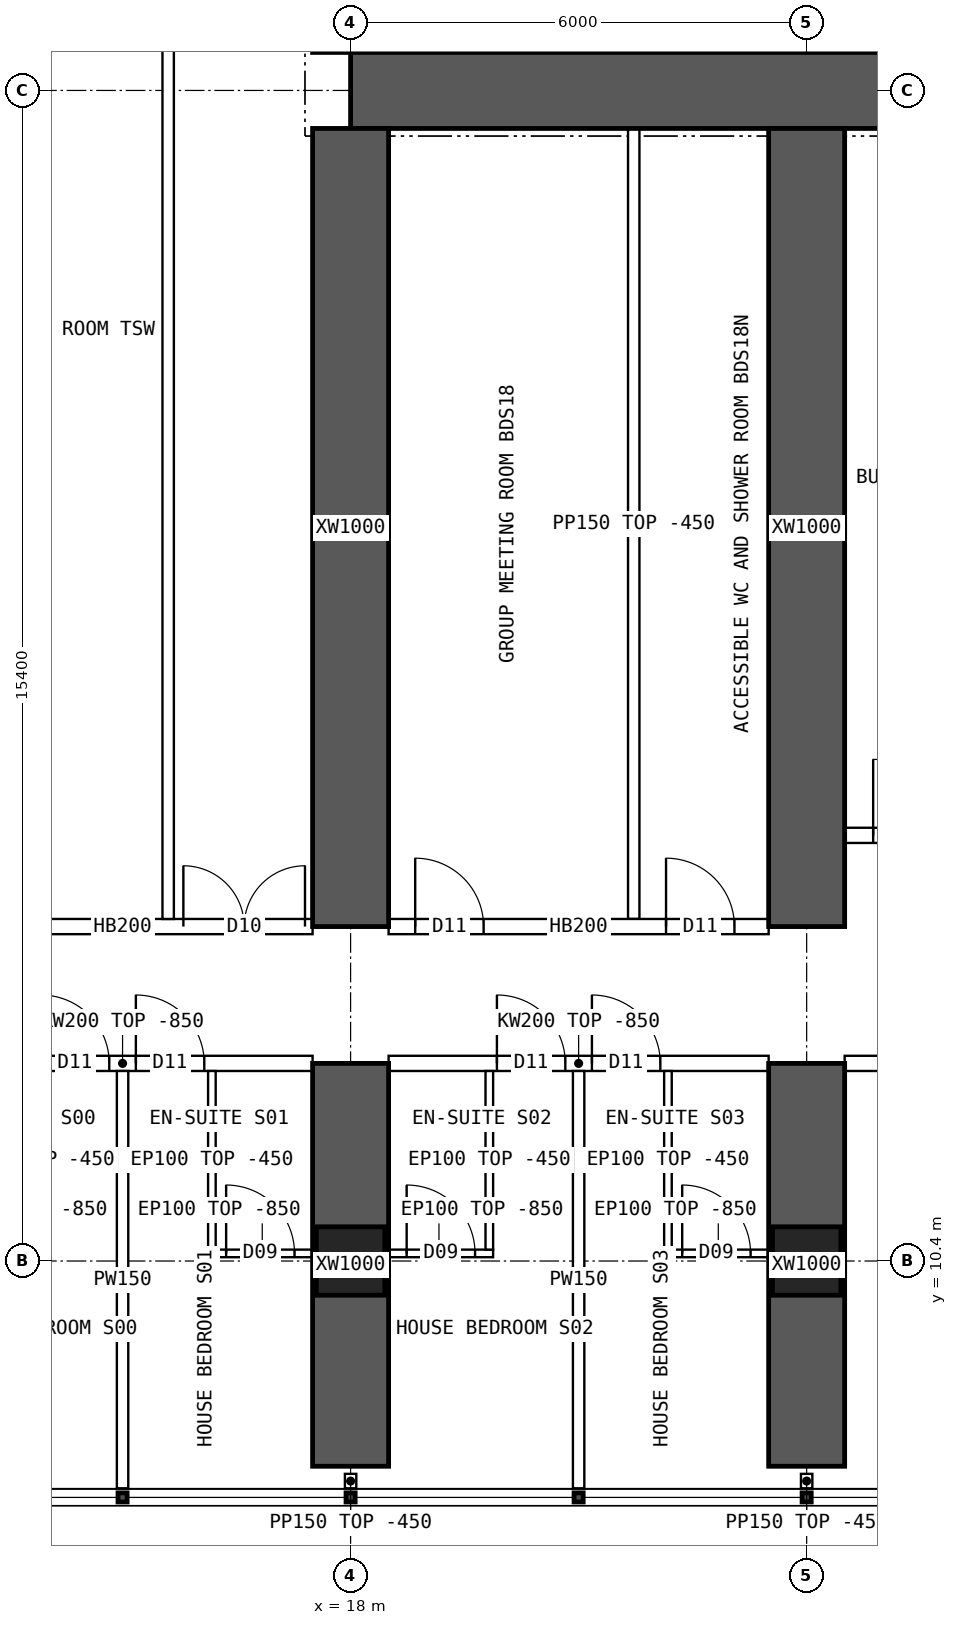
"""IFC4 building model, lengths in metres.
Left out: names, types, materials, properties, quantities, classifications, styles, units other than length and angle.
Written with IfcOpenShell. Run it as: python <this file> out.ifc"""

import sys

from ifc_helpers import new_model, si_unit, direction, frame, frame_2d, origin, origin_2d, place, context, subcontext, project, spatial, polyline, rectangle, hollow_rectangle, outline, extrude, element, fill, save


model = new_model("IFC4")
c1 = context("Model", 3, precision=1e-05, world=origin(), true_north=direction((0.0, 1.0)))
c2 = subcontext(c1, "Body", "Model", "MODEL_VIEW")
j1 = project(units=[si_unit("LENGTHUNIT", "METRE"), si_unit("PLANEANGLEUNIT", "RADIAN")], contexts=[c1])
p1 = place(None, origin())
s1 = spatial("IfcSite", under=j1, at=p1, CompositionType="ELEMENT")
p2 = place(p1, origin())
s2 = spatial("IfcBuilding", under=s1, at=p2, CompositionType="ELEMENT")
p3 = place(p2, frame((0.0, 0.0, 20.2)))
s3 = spatial("IfcBuildingStorey", under=s2, at=p3, CompositionType="ELEMENT", Elevation=20.2)
for number, where, z_axis, x_axis in (
    (1, (18.0, 10.4, 0.0), (0.0, 0.0, 1.0), (1.0, 0.0, 0.0)),
    (2, (24.0, 10.4, 0.0), (0.0, 0.0, 1.0), (1.0, 0.0, 0.0)),
):
    element("IfcColumn", number, at=place(p3, frame(where, z_axis=z_axis, x_axis=x_axis)), inside=s3, PredefinedType="COLUMN", context=c2, shape_type="SweptSolid", body=[
        extrude(hollow_rectangle(XDim=0.9, YDim=0.9, WallThickness=0.09, at=origin_2d()), origin(), (0.0, 0.0, 1.0), 3.75),
    ])
p4 = place(p3, frame((18.0, 25.8, 0.0), z_axis=(0.0, 0.0, 1.0), x_axis=(1.0, 0.0, 0.0)))
e3 = element("IfcWall", 3, at=p4, inside=s3, PredefinedType="SHEAR", context=c2, shape_type="SweptSolid", body=[
    extrude(rectangle(XDim=48.0, YDim=1.0, at=frame_2d((24.0, 0.0))), origin(), (0.0, 0.0, 1.0), 3.75),
])
p5 = place(p3, frame((18.0, 7.7, 0.0), z_axis=(0.0, 0.0, 1.0), x_axis=(0.0, 1.0, 0.0)))
e4 = element("IfcWall", 4, at=p5, inside=s3, PredefinedType="SHEAR", context=c2, shape_type="SweptSolid", body=[
    extrude(rectangle(XDim=5.3, YDim=1.0, at=frame_2d((2.65, 0.0))), origin(), (0.0, 0.0, 1.0), 3.75),
])
p6 = place(p3, frame((18.0, 14.8, 0.0), z_axis=(0.0, 0.0, 1.0), x_axis=(0.0, 1.0, 0.0)))
e5 = element("IfcWall", 5, at=p6, inside=s3, PredefinedType="SHEAR", context=c2, shape_type="SweptSolid", body=[
    extrude(rectangle(XDim=10.5, YDim=1.0, at=frame_2d((5.25, 0.0))), origin(), (0.0, 0.0, 1.0), 3.75),
])
p7 = place(p3, frame((24.0, 7.7, 0.0), z_axis=(0.0, 0.0, 1.0), x_axis=(0.0, 1.0, 0.0)))
e6 = element("IfcWall", 6, at=p7, inside=s3, PredefinedType="SHEAR", context=c2, shape_type="SweptSolid", body=[
    extrude(rectangle(XDim=5.3, YDim=1.0, at=frame_2d((2.65, 0.0))), origin(), (0.0, 0.0, 1.0), 3.75),
])
p8 = place(p3, frame((24.0, 14.8, 0.0), z_axis=(0.0, 0.0, 1.0), x_axis=(0.0, 1.0, 0.0)))
e7 = element("IfcWall", 7, at=p8, inside=s3, PredefinedType="SHEAR", context=c2, shape_type="SweptSolid", body=[
    extrude(rectangle(XDim=10.5, YDim=1.0, at=frame_2d((5.25, 0.0))), origin(), (0.0, 0.0, 1.0), 3.75),
])
p9 = place(p3, frame((12.5, 13.0, 0.0), z_axis=(0.0, 0.0, 1.0), x_axis=(1.0, 0.0, 0.0)))
e8 = element("IfcWall", 8, at=p9, inside=s3, PredefinedType="SOLIDWALL", context=c2, shape_type="SweptSolid", body=[
    extrude(outline(polyline([(0.0, 0.0), (5.0, 0.0), (5.0, 2.9), (0.0, 2.9), (0.0, 0.0)])), frame((0.0, 0.1, 0.0), z_axis=(0.0, -1.0, 0.0), x_axis=(1.0, 0.0, 0.0)), (0.0, 0.0, 1.0), 0.2),
])
p10 = place(p9, frame((1.425, 0.0, 0.0)))
e9 = element("IfcOpeningElement", 9, at=p10, cuts=e8, PredefinedType="OPENING", context=c2, shape_type="SweptSolid", body=[
    extrude(rectangle(XDim=0.9, YDim=2.1, at=frame_2d((0.45, 1.05))), frame((0.0, 0.11, 0.0), z_axis=(0.0, -1.0, 0.0), x_axis=(1.0, 0.0, 0.0)), (0.0, 0.0, 1.0), 0.22),
])
p11 = place(p9, frame((2.675, 0.0, 0.0)))
e10 = element("IfcOpeningElement", 10, at=p11, cuts=e8, PredefinedType="OPENING", context=c2, shape_type="SweptSolid", body=[
    extrude(rectangle(XDim=0.9, YDim=2.1, at=frame_2d((0.45, 1.05))), frame((0.0, 0.11, 0.0), z_axis=(0.0, -1.0, 0.0), x_axis=(1.0, 0.0, 0.0)), (0.0, 0.0, 1.0), 0.22),
])
p12 = place(p3, frame((12.5, 14.8, 0.0), z_axis=(0.0, 0.0, 1.0), x_axis=(1.0, 0.0, 0.0)))
e11 = element("IfcWall", 11, at=p12, inside=s3, PredefinedType="SOLIDWALL", context=c2, shape_type="SweptSolid", body=[
    extrude(rectangle(XDim=5.0, YDim=0.2, at=frame_2d((2.5, 0.0))), origin(), (0.0, 0.0, 1.0), 3.3),
])
p13 = place(p12, frame((3.3, 0.0, 0.0)))
e12 = element("IfcOpeningElement", 12, at=p13, cuts=e11, PredefinedType="OPENING", context=c2, shape_type="SweptSolid", body=[
    extrude(rectangle(XDim=1.6, YDim=2.1, at=frame_2d((0.8, 1.05))), frame((0.0, 0.11, 0.0), z_axis=(0.0, -1.0, 0.0), x_axis=(1.0, 0.0, 0.0)), (0.0, 0.0, 1.0), 0.22),
])
p14 = place(p3, frame((18.5, 13.0, 0.0), z_axis=(0.0, 0.0, 1.0), x_axis=(1.0, 0.0, 0.0)))
e13 = element("IfcWall", 13, at=p14, inside=s3, PredefinedType="SOLIDWALL", context=c2, shape_type="SweptSolid", body=[
    extrude(outline(polyline([(0.0, 0.0), (5.0, 0.0), (5.0, 2.9), (0.0, 2.9), (0.0, 0.0)])), frame((0.0, 0.1, 0.0), z_axis=(0.0, -1.0, 0.0), x_axis=(1.0, 0.0, 0.0)), (0.0, 0.0, 1.0), 0.2),
])
p15 = place(p14, frame((1.425, 0.0, 0.0)))
e14 = element("IfcOpeningElement", 14, at=p15, cuts=e13, PredefinedType="OPENING", context=c2, shape_type="SweptSolid", body=[
    extrude(rectangle(XDim=0.9, YDim=2.1, at=frame_2d((0.45, 1.05))), frame((0.0, 0.11, 0.0), z_axis=(0.0, -1.0, 0.0), x_axis=(1.0, 0.0, 0.0)), (0.0, 0.0, 1.0), 0.22),
])
p16 = place(p14, frame((2.675, 0.0, 0.0)))
e15 = element("IfcOpeningElement", 15, at=p16, cuts=e13, PredefinedType="OPENING", context=c2, shape_type="SweptSolid", body=[
    extrude(rectangle(XDim=0.9, YDim=2.1, at=frame_2d((0.45, 1.05))), frame((0.0, 0.11, 0.0), z_axis=(0.0, -1.0, 0.0), x_axis=(1.0, 0.0, 0.0)), (0.0, 0.0, 1.0), 0.22),
])
p17 = place(p3, frame((18.5, 14.8, 0.0), z_axis=(0.0, 0.0, 1.0), x_axis=(1.0, 0.0, 0.0)))
e16 = element("IfcWall", 16, at=p17, inside=s3, PredefinedType="SOLIDWALL", context=c2, shape_type="SweptSolid", body=[
    extrude(rectangle(XDim=5.0, YDim=0.2, at=frame_2d((2.5, 0.0))), origin(), (0.0, 0.0, 1.0), 3.3),
])
p18 = place(p17, frame((0.35, 0.0, 0.0)))
e17 = element("IfcOpeningElement", 17, at=p18, cuts=e16, PredefinedType="OPENING", context=c2, shape_type="SweptSolid", body=[
    extrude(rectangle(XDim=0.9, YDim=2.1, at=frame_2d((0.45, 1.05))), frame((0.0, 0.11, 0.0), z_axis=(0.0, -1.0, 0.0), x_axis=(1.0, 0.0, 0.0)), (0.0, 0.0, 1.0), 0.22),
])
p19 = place(p17, frame((3.65, 0.0, 0.0)))
e18 = element("IfcOpeningElement", 18, at=p19, cuts=e16, PredefinedType="OPENING", context=c2, shape_type="SweptSolid", body=[
    extrude(rectangle(XDim=0.9, YDim=2.1, at=frame_2d((0.45, 1.05))), frame((0.0, 0.11, 0.0), z_axis=(0.0, -1.0, 0.0), x_axis=(1.0, 0.0, 0.0)), (0.0, 0.0, 1.0), 0.22),
])
p20 = place(p3, frame((24.5, 13.0, 0.0), z_axis=(0.0, 0.0, 1.0), x_axis=(1.0, 0.0, 0.0)))
e19 = element("IfcWall", 19, at=p20, inside=s3, PredefinedType="SOLIDWALL", context=c2, shape_type="SweptSolid", body=[
    extrude(outline(polyline([(0.0, 0.0), (5.0, 0.0), (5.0, 2.9), (0.0, 2.9), (0.0, 0.0)])), frame((0.0, 0.1, 0.0), z_axis=(0.0, -1.0, 0.0), x_axis=(1.0, 0.0, 0.0)), (0.0, 0.0, 1.0), 0.2),
])
p21 = place(p20, frame((0.6, 0.0, 0.0)))
e20 = element("IfcOpeningElement", 20, at=p21, cuts=e19, PredefinedType="OPENING", context=c2, shape_type="SweptSolid", body=[
    extrude(rectangle(XDim=1.0, YDim=2.1, at=frame_2d((0.5, 1.05))), frame((0.0, 0.11, 0.0), z_axis=(0.0, -1.0, 0.0), x_axis=(1.0, 0.0, 0.0)), (0.0, 0.0, 1.0), 0.22),
])
p22 = place(p3, frame((15.0, 7.41, 0.0), z_axis=(0.0, 0.0, 1.0), x_axis=(0.0, 1.0, 0.0)))
e21 = element("IfcWall", 21, at=p22, inside=s3, PredefinedType="PARTITIONING", context=c2, shape_type="SweptSolid", body=[
    extrude(outline(polyline([(0.0, 0.0), (5.49, 0.0), (5.49, 2.9), (5.442, 2.9), (5.44, 3.3), (3.192, 3.3), (3.19, 2.9), (2.792, 2.9), (2.79, 3.3), (0.0, 3.3), (0.0, 0.0)])), frame((0.0, 0.075, 0.0), z_axis=(0.0, -1.0, 0.0), x_axis=(1.0, 0.0, 0.0)), (0.0, 0.0, 1.0), 0.15),
])
p23 = place(p3, frame((17.55, 10.5, 0.0), z_axis=(0.0, 0.0, 1.0), x_axis=(-1.0, 0.0, 0.0)))
e22 = element("IfcWall", 22, at=p23, inside=s3, PredefinedType="PARTITIONING", context=c2, shape_type="SweptSolid", body=[
    extrude(outline(polyline([(0.0, 0.0), (1.425, 0.0), (1.425, 2.9), (0.0, 2.9), (0.0, 0.0)])), frame((0.0, 0.05, 0.0), z_axis=(0.0, -1.0, 0.0), x_axis=(1.0, 0.0, 0.0)), (0.0, 0.0, 1.0), 0.1),
])
p24 = place(p23, frame((0.288, 0.0, 0.0)))
e23 = element("IfcOpeningElement", 23, at=p24, cuts=e22, PredefinedType="OPENING", context=c2, shape_type="SweptSolid", body=[
    extrude(rectangle(XDim=0.9, YDim=2.1, at=frame_2d((0.45, 1.05))), frame((0.0, 0.06, 0.0), z_axis=(0.0, -1.0, 0.0), x_axis=(1.0, 0.0, 0.0)), (0.0, 0.0, 1.0), 0.12),
])
p25 = place(p3, frame((16.175, 10.55, 0.0), z_axis=(0.0, 0.0, 1.0), x_axis=(0.0, 1.0, 0.0)))
e24 = element("IfcWall", 24, at=p25, inside=s3, PredefinedType="PARTITIONING", context=c2, shape_type="SweptSolid", body=[
    extrude(outline(polyline([(0.0, 0.0), (2.35, 0.0), (2.35, 2.9), (2.302, 2.9), (2.3, 3.3), (0.052, 3.3), (0.05, 2.9), (0.0, 2.9), (0.0, 0.0)])), frame((0.0, 0.05, 0.0), z_axis=(0.0, -1.0, 0.0), x_axis=(1.0, 0.0, 0.0)), (0.0, 0.0, 1.0), 0.1),
])
p26 = place(p3, frame((21.0, 7.41, 0.0), z_axis=(0.0, 0.0, 1.0), x_axis=(0.0, 1.0, 0.0)))
e25 = element("IfcWall", 25, at=p26, inside=s3, PredefinedType="PARTITIONING", context=c2, shape_type="SweptSolid", body=[
    extrude(outline(polyline([(0.0, 0.0), (5.49, 0.0), (5.49, 2.9), (5.442, 2.9), (5.44, 3.3), (3.192, 3.3), (3.19, 2.9), (2.792, 2.9), (2.79, 3.3), (0.0, 3.3), (0.0, 0.0)])), frame((0.0, 0.075, 0.0), z_axis=(0.0, -1.0, 0.0), x_axis=(1.0, 0.0, 0.0)), (0.0, 0.0, 1.0), 0.15),
])
p27 = place(p3, frame((19.875, 10.5, 0.0), z_axis=(0.0, 0.0, 1.0), x_axis=(-1.0, 0.0, 0.0)))
e26 = element("IfcWall", 26, at=p27, inside=s3, PredefinedType="PARTITIONING", context=c2, shape_type="SweptSolid", body=[
    extrude(outline(polyline([(0.0, 0.0), (1.425, 0.0), (1.425, 2.9), (0.0, 2.9), (0.0, 0.0)])), frame((0.0, 0.05, 0.0), z_axis=(0.0, -1.0, 0.0), x_axis=(1.0, 0.0, 0.0)), (0.0, 0.0, 1.0), 0.1),
])
p28 = place(p27, frame((0.238, 0.0, 0.0)))
e27 = element("IfcOpeningElement", 27, at=p28, cuts=e26, PredefinedType="OPENING", context=c2, shape_type="SweptSolid", body=[
    extrude(rectangle(XDim=0.9, YDim=2.1, at=frame_2d((0.45, 1.05))), frame((0.0, 0.06, 0.0), z_axis=(0.0, -1.0, 0.0), x_axis=(1.0, 0.0, 0.0)), (0.0, 0.0, 1.0), 0.12),
])
p29 = place(p3, frame((19.825, 10.55, 0.0), z_axis=(0.0, 0.0, 1.0), x_axis=(0.0, 1.0, 0.0)))
e28 = element("IfcWall", 28, at=p29, inside=s3, PredefinedType="PARTITIONING", context=c2, shape_type="SweptSolid", body=[
    extrude(outline(polyline([(0.0, 0.0), (2.35, 0.0), (2.35, 2.9), (2.302, 2.9), (2.3, 3.3), (0.052, 3.3), (0.05, 2.9), (0.0, 2.9), (0.0, 0.0)])), frame((0.0, 0.05, 0.0), z_axis=(0.0, -1.0, 0.0), x_axis=(1.0, 0.0, 0.0)), (0.0, 0.0, 1.0), 0.1),
])
p30 = place(p3, frame((23.55, 10.5, 0.0), z_axis=(0.0, 0.0, 1.0), x_axis=(-1.0, 0.0, 0.0)))
e29 = element("IfcWall", 29, at=p30, inside=s3, PredefinedType="PARTITIONING", context=c2, shape_type="SweptSolid", body=[
    extrude(outline(polyline([(0.0, 0.0), (1.425, 0.0), (1.425, 2.9), (0.0, 2.9), (0.0, 0.0)])), frame((0.0, 0.05, 0.0), z_axis=(0.0, -1.0, 0.0), x_axis=(1.0, 0.0, 0.0)), (0.0, 0.0, 1.0), 0.1),
])
p31 = place(p30, frame((0.288, 0.0, 0.0)))
e30 = element("IfcOpeningElement", 30, at=p31, cuts=e29, PredefinedType="OPENING", context=c2, shape_type="SweptSolid", body=[
    extrude(rectangle(XDim=0.9, YDim=2.1, at=frame_2d((0.45, 1.05))), frame((0.0, 0.06, 0.0), z_axis=(0.0, -1.0, 0.0), x_axis=(1.0, 0.0, 0.0)), (0.0, 0.0, 1.0), 0.12),
])
p32 = place(p3, frame((22.175, 10.55, 0.0), z_axis=(0.0, 0.0, 1.0), x_axis=(0.0, 1.0, 0.0)))
e31 = element("IfcWall", 31, at=p32, inside=s3, PredefinedType="PARTITIONING", context=c2, shape_type="SweptSolid", body=[
    extrude(outline(polyline([(0.0, 0.0), (2.35, 0.0), (2.35, 2.9), (2.302, 2.9), (2.3, 3.3), (0.052, 3.3), (0.05, 2.9), (0.0, 2.9), (0.0, 0.0)])), frame((0.0, 0.05, 0.0), z_axis=(0.0, -1.0, 0.0), x_axis=(1.0, 0.0, 0.0)), (0.0, 0.0, 1.0), 0.1),
])
p33 = place(p3, frame((21.725, 14.9, 0.0), z_axis=(0.0, 0.0, 1.0), x_axis=(0.0, 1.0, 0.0)))
e32 = element("IfcWall", 32, at=p33, inside=s3, PredefinedType="PARTITIONING", context=c2, shape_type="SweptSolid", body=[
    extrude(rectangle(XDim=10.4, YDim=0.15, at=frame_2d((5.2, 0.0))), origin(), (0.0, 0.0, 1.0), 3.3),
])
p34 = place(p3, frame((24.5, 16.0, 0.0), z_axis=(0.0, 0.0, 1.0), x_axis=(1.0, 0.0, 0.0)))
e33 = element("IfcWall", 33, at=p34, inside=s3, PredefinedType="SOLIDWALL", context=c2, shape_type="SweptSolid", body=[
    extrude(rectangle(XDim=5.0, YDim=0.2, at=frame_2d((2.5, 0.0))), origin(), (0.0, 0.0, 1.0), 3.3),
])
p35 = place(p34, frame((0.375, 0.0, 0.0)))
e34 = element("IfcOpeningElement", 34, at=p35, cuts=e33, PredefinedType="OPENING", context=c2, shape_type="SweptSolid", body=[
    extrude(rectangle(XDim=1.0, YDim=2.1, at=frame_2d((0.5, 1.05))), frame((0.0, 0.11, 0.0), z_axis=(0.0, -1.0, 0.0), x_axis=(1.0, 0.0, 0.0)), (0.0, 0.0, 1.0), 0.22),
])
p36 = place(p3, frame((15.6, 14.9, 0.0), z_axis=(0.0, 0.0, 1.0), x_axis=(0.0, 1.0, 0.0)))
e35 = element("IfcWall", 35, at=p36, inside=s3, PredefinedType="PARTITIONING", context=c2, shape_type="SweptSolid", body=[
    extrude(rectangle(XDim=34.2, YDim=0.15, at=frame_2d((17.1, 0.0))), origin(), (0.0, 0.0, 1.0), 3.3),
])
p37 = place(p36, frame((13.5, 0.0, 0.0)))
e36 = element("IfcOpeningElement", 36, at=p37, cuts=e35, PredefinedType="OPENING", context=c2, shape_type="SweptSolid", body=[
    extrude(rectangle(XDim=1.0, YDim=2.1, at=frame_2d((0.5, 1.05))), frame((0.0, 0.085, 0.0), z_axis=(0.0, -1.0, 0.0), x_axis=(1.0, 0.0, 0.0)), (0.0, 0.0, 1.0), 0.17),
])
p38 = place(p36, frame((16.5, 0.0, 0.0)))
e37 = element("IfcOpeningElement", 37, at=p38, cuts=e35, PredefinedType="OPENING", context=c2, shape_type="SweptSolid", body=[
    extrude(rectangle(XDim=1.0, YDim=2.1, at=frame_2d((0.5, 1.05))), frame((0.0, 0.085, 0.0), z_axis=(0.0, -1.0, 0.0), x_axis=(1.0, 0.0, 0.0)), (0.0, 0.0, 1.0), 0.17),
])
for number, where, z_axis, x_axis in (
    (38, (18.0, 7.6, 0.0), (0.0, 0.0, 1.0), (0.0, -1.0, 0.0)),
    (39, (24.0, 7.6, 0.0), (0.0, 0.0, 1.0), (0.0, -1.0, 0.0)),
):
    element("IfcWall", number, at=place(p3, frame(where, z_axis=z_axis, x_axis=x_axis)), inside=s3, PredefinedType="PARTITIONING", context=c2, shape_type="SweptSolid", body=[
        extrude(rectangle(XDim=0.19, YDim=0.15, at=frame_2d((0.095, 0.0))), origin(), (0.0, 0.0, 1.0), 3.3),
    ])
p39 = place(p13, origin())
e40 = element("IfcDoor", 40, at=p39, inside=s3, OperationType="DOUBLE_DOOR_SINGLE_SWING", PredefinedType="DOOR", context=c2, shape_type="SweptSolid", body=[
    extrude(rectangle(XDim=1.6, YDim=2.1, at=frame_2d((0.8, 1.05))), frame((0.0, 0.025, 0.0), z_axis=(0.0, -1.0, 0.0), x_axis=(1.0, 0.0, 0.0)), (0.0, 0.0, 1.0), 0.05),
])
fill(e12, e40)
p40 = place(p10, origin())
e41 = element("IfcDoor", 41, at=p40, inside=s3, OperationType="SINGLE_SWING_LEFT", PredefinedType="DOOR", context=c2, shape_type="SweptSolid", body=[
    extrude(rectangle(XDim=0.9, YDim=2.1, at=frame_2d((0.45, 1.05))), frame((0.0, 0.025, 0.0), z_axis=(0.0, -1.0, 0.0), x_axis=(1.0, 0.0, 0.0)), (0.0, 0.0, 1.0), 0.05),
])
fill(e9, e41)
p41 = place(p24, origin())
e42 = element("IfcDoor", 42, at=p41, inside=s3, OperationType="SINGLE_SWING_RIGHT", PredefinedType="DOOR", context=c2, shape_type="SweptSolid", body=[
    extrude(rectangle(XDim=0.9, YDim=2.1, at=frame_2d((0.45, 1.05))), frame((0.0, 0.025, 0.0), z_axis=(0.0, -1.0, 0.0), x_axis=(1.0, 0.0, 0.0)), (0.0, 0.0, 1.0), 0.05),
])
fill(e23, e42)
p42 = place(p11, origin())
e43 = element("IfcDoor", 43, at=p42, inside=s3, OperationType="SINGLE_SWING_LEFT", PredefinedType="DOOR", context=c2, shape_type="SweptSolid", body=[
    extrude(rectangle(XDim=0.9, YDim=2.1, at=frame_2d((0.45, 1.05))), frame((0.0, 0.025, 0.0), z_axis=(0.0, -1.0, 0.0), x_axis=(1.0, 0.0, 0.0)), (0.0, 0.0, 1.0), 0.05),
])
fill(e10, e43)
p43 = place(p28, origin())
e44 = element("IfcDoor", 44, at=p43, inside=s3, OperationType="SINGLE_SWING_RIGHT", PredefinedType="DOOR", context=c2, shape_type="SweptSolid", body=[
    extrude(rectangle(XDim=0.9, YDim=2.1, at=frame_2d((0.45, 1.05))), frame((0.0, 0.025, 0.0), z_axis=(0.0, -1.0, 0.0), x_axis=(1.0, 0.0, 0.0)), (0.0, 0.0, 1.0), 0.05),
])
fill(e27, e44)
p44 = place(p15, origin())
e45 = element("IfcDoor", 45, at=p44, inside=s3, OperationType="SINGLE_SWING_LEFT", PredefinedType="DOOR", context=c2, shape_type="SweptSolid", body=[
    extrude(rectangle(XDim=0.9, YDim=2.1, at=frame_2d((0.45, 1.05))), frame((0.0, 0.025, 0.0), z_axis=(0.0, -1.0, 0.0), x_axis=(1.0, 0.0, 0.0)), (0.0, 0.0, 1.0), 0.05),
])
fill(e14, e45)
p45 = place(p31, origin())
e46 = element("IfcDoor", 46, at=p45, inside=s3, OperationType="SINGLE_SWING_RIGHT", PredefinedType="DOOR", context=c2, shape_type="SweptSolid", body=[
    extrude(rectangle(XDim=0.9, YDim=2.1, at=frame_2d((0.45, 1.05))), frame((0.0, 0.025, 0.0), z_axis=(0.0, -1.0, 0.0), x_axis=(1.0, 0.0, 0.0)), (0.0, 0.0, 1.0), 0.05),
])
fill(e30, e46)
p46 = place(p16, origin())
e47 = element("IfcDoor", 47, at=p46, inside=s3, OperationType="SINGLE_SWING_LEFT", PredefinedType="DOOR", context=c2, shape_type="SweptSolid", body=[
    extrude(rectangle(XDim=0.9, YDim=2.1, at=frame_2d((0.45, 1.05))), frame((0.0, 0.025, 0.0), z_axis=(0.0, -1.0, 0.0), x_axis=(1.0, 0.0, 0.0)), (0.0, 0.0, 1.0), 0.05),
])
fill(e15, e47)
p47 = place(p18, origin())
e48 = element("IfcDoor", 48, at=p47, inside=s3, OperationType="SINGLE_SWING_LEFT", PredefinedType="DOOR", context=c2, shape_type="SweptSolid", body=[
    extrude(rectangle(XDim=0.9, YDim=2.1, at=frame_2d((0.45, 1.05))), frame((0.0, 0.025, 0.0), z_axis=(0.0, -1.0, 0.0), x_axis=(1.0, 0.0, 0.0)), (0.0, 0.0, 1.0), 0.05),
])
fill(e17, e48)
p48 = place(p19, origin())
e49 = element("IfcDoor", 49, at=p48, inside=s3, OperationType="SINGLE_SWING_LEFT", PredefinedType="DOOR", context=c2, shape_type="SweptSolid", body=[
    extrude(rectangle(XDim=0.9, YDim=2.1, at=frame_2d((0.45, 1.05))), frame((0.0, 0.025, 0.0), z_axis=(0.0, -1.0, 0.0), x_axis=(1.0, 0.0, 0.0)), (0.0, 0.0, 1.0), 0.05),
])
fill(e18, e49)
p49 = place(p35, origin())
e50 = element("IfcDoor", 50, at=p49, inside=s3, OperationType="SINGLE_SWING_LEFT", PredefinedType="DOOR", context=c2, shape_type="SweptSolid", body=[
    extrude(rectangle(XDim=1.0, YDim=2.1, at=frame_2d((0.5, 1.05))), frame((0.0, 0.025, 0.0), z_axis=(0.0, -1.0, 0.0), x_axis=(1.0, 0.0, 0.0)), (0.0, 0.0, 1.0), 0.05),
])
fill(e34, e50)
save(model, sys.argv[1])
